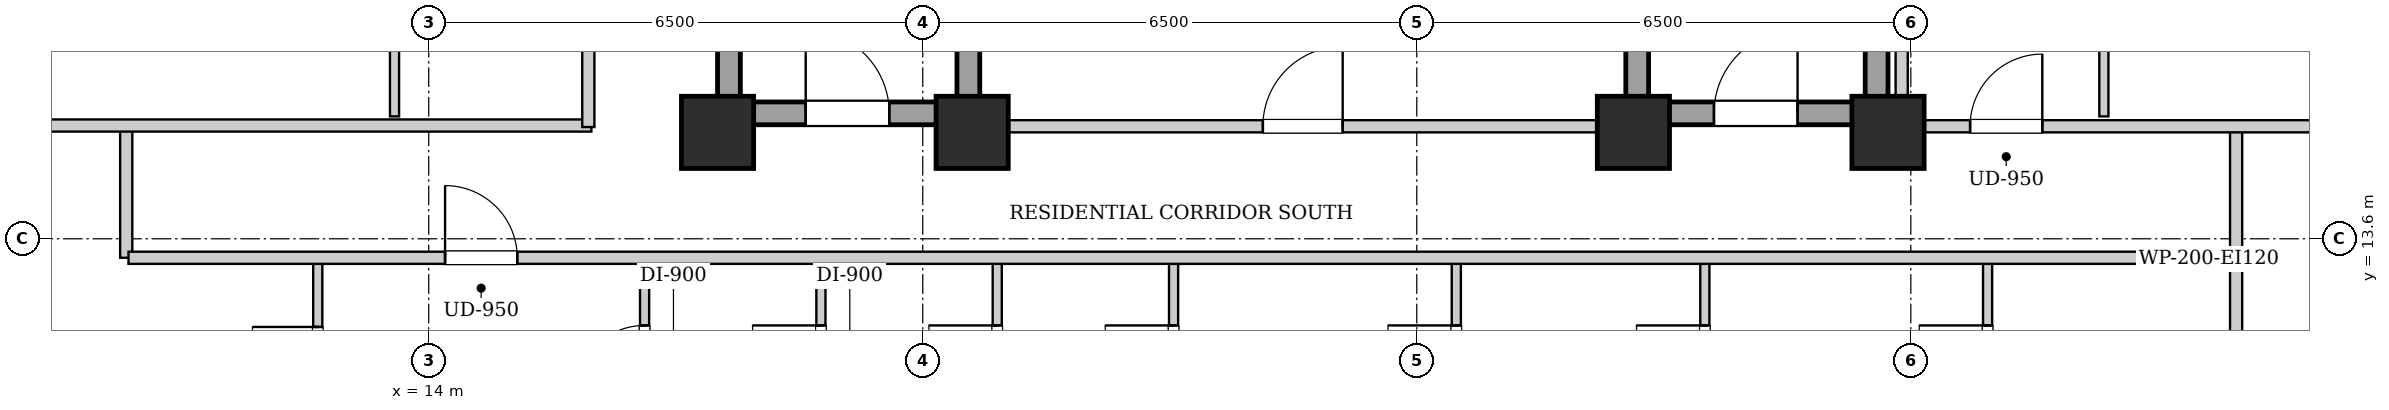
"""IFC4 building model, lengths in metres.
Left out: names, types, materials, properties, quantities, classifications, styles, units other than length and angle.
Written with IfcOpenShell. Run it as: python <this file> out.ifc"""

import sys

from ifc_helpers import new_model, si_unit, direction, frame, frame_2d, origin, origin_2d, place, context, subcontext, project, spatial, rectangle, extrude, element, fill, save


model = new_model("IFC4")
c1 = context("Model", 3, precision=1e-05, world=origin(), true_north=direction((0.0, 1.0)))
c2 = subcontext(c1, "Body", "Model", "MODEL_VIEW")
j1 = project(units=[si_unit("LENGTHUNIT", "METRE"), si_unit("PLANEANGLEUNIT", "RADIAN")], contexts=[c1])
p1 = place(None, origin())
s1 = spatial("IfcSite", under=j1, at=p1, CompositionType="ELEMENT")
p2 = place(p1, origin())
s2 = spatial("IfcBuilding", under=s1, at=p2, CompositionType="ELEMENT")
p3 = place(p2, frame((0.0, 0.0, 127.65)))
s3 = spatial("IfcBuildingStorey", under=s2, at=p3, CompositionType="ELEMENT", Elevation=127.65)
for number, where, z_axis, x_axis in (
    (1, (17.8, 15.0, 0.0), (0.0, 0.0, 1.0), (1.0, 0.0, 0.0)),
    (2, (21.15, 15.0, 0.0), (0.0, 0.0, 1.0), (1.0, 0.0, 0.0)),
    (3, (29.85, 15.0, 0.0), (0.0, 0.0, 1.0), (1.0, 0.0, 0.0)),
    (4, (33.2, 15.0, 0.0), (0.0, 0.0, 1.0), (1.0, 0.0, 0.0)),
):
    element("IfcColumn", number, at=place(p3, frame(where, z_axis=z_axis, x_axis=x_axis)), inside=s3, PredefinedType="COLUMN", context=c2, shape_type="SweptSolid", body=[
        extrude(rectangle(XDim=0.95, YDim=0.95, at=origin_2d()), origin(), (0.0, 0.0, 1.0), 3.25),
    ])
for number, where, z_axis, x_axis in (
    (5, (17.95, 15.1, 0.0), (0.0, 0.0, 1.0), (0.0, 1.0, 0.0)),
    (6, (21.1, 15.1, 0.0), (0.0, 0.0, 1.0), (0.0, 1.0, 0.0)),
):
    element("IfcWall", number, at=place(p3, frame(where, z_axis=z_axis, x_axis=x_axis)), inside=s3, PredefinedType="SHEAR", context=c2, shape_type="SweptSolid", body=[
        extrude(rectangle(XDim=9.0, YDim=0.3, at=frame_2d((4.5, 0.0))), origin(), (0.0, 0.0, 1.0), 2.99),
    ])
p4 = place(p3, frame((18.1, 15.25, 0.0), z_axis=(0.0, 0.0, 1.0), x_axis=(1.0, 0.0, 0.0)))
e7 = element("IfcWall", 7, at=p4, inside=s3, PredefinedType="SHEAR", context=c2, shape_type="SweptSolid", body=[
    extrude(rectangle(XDim=2.85, YDim=0.3, at=frame_2d((1.425, 0.0))), origin(), (0.0, 0.0, 1.0), 2.99),
])
p5 = place(p4, frame((0.86, 0.0, 0.0)))
e8 = element("IfcOpeningElement", 8, at=p5, cuts=e7, PredefinedType="OPENING", context=c2, shape_type="SweptSolid", body=[
    extrude(rectangle(XDim=1.1, YDim=2.05, at=frame_2d((0.55, 1.025))), frame((0.0, 0.16, 0.0), z_axis=(0.0, -1.0, 0.0), x_axis=(1.0, 0.0, 0.0)), (0.0, 0.0, 1.0), 0.32),
])
for number, where, z_axis, x_axis in (
    (9, (29.9, 15.1, 0.0), (0.0, 0.0, 1.0), (0.0, 1.0, 0.0)),
    (10, (33.05, 15.1, 0.0), (0.0, 0.0, 1.0), (0.0, 1.0, 0.0)),
):
    element("IfcWall", number, at=place(p3, frame(where, z_axis=z_axis, x_axis=x_axis)), inside=s3, PredefinedType="SHEAR", context=c2, shape_type="SweptSolid", body=[
        extrude(rectangle(XDim=9.0, YDim=0.3, at=frame_2d((4.5, 0.0))), origin(), (0.0, 0.0, 1.0), 2.99),
    ])
p6 = place(p3, frame((30.05, 15.25, 0.0), z_axis=(0.0, 0.0, 1.0), x_axis=(1.0, 0.0, 0.0)))
e11 = element("IfcWall", 11, at=p6, inside=s3, PredefinedType="SHEAR", context=c2, shape_type="SweptSolid", body=[
    extrude(rectangle(XDim=2.85, YDim=0.3, at=frame_2d((1.425, 0.0))), origin(), (0.0, 0.0, 1.0), 2.99),
])
p7 = place(p6, frame((0.86, 0.0, 0.0)))
e12 = element("IfcOpeningElement", 12, at=p7, cuts=e11, PredefinedType="OPENING", context=c2, shape_type="SweptSolid", body=[
    extrude(rectangle(XDim=1.1, YDim=2.05, at=frame_2d((0.55, 1.025))), frame((0.0, 0.16, 0.0), z_axis=(0.0, -1.0, 0.0), x_axis=(1.0, 0.0, 0.0)), (0.0, 0.0, 1.0), 0.32),
])
p8 = place(p3, frame((21.25, 15.08, 0.0), z_axis=(0.0, 0.0, 1.0), x_axis=(1.0, 0.0, 0.0)))
e13 = element("IfcWall", 13, at=p8, inside=s3, PredefinedType="PARTITIONING", context=c2, shape_type="SweptSolid", body=[
    extrude(rectangle(XDim=8.5, YDim=0.16, at=frame_2d((4.25, 0.0))), origin(), (0.0, 0.0, 1.0), 2.426),
])
p9 = place(p8, frame((3.725, 0.0, 0.0)))
e14 = element("IfcOpeningElement", 14, at=p9, cuts=e13, PredefinedType="OPENING", context=c2, shape_type="SweptSolid", body=[
    extrude(rectangle(XDim=1.05, YDim=2.05, at=frame_2d((0.525, 1.025))), frame((0.0, 0.09, 0.0), z_axis=(0.0, -1.0, 0.0), x_axis=(1.0, 0.0, 0.0)), (0.0, 0.0, 1.0), 0.18),
])
for number, where, z_axis, x_axis in (
    (15, (10.02, 13.35, 0.0), (0.0, 0.0, 1.0), (0.0, 1.0, 0.0)),
    (16, (37.78, 13.35, 0.0), (0.0, 0.0, 1.0), (0.0, 1.0, 0.0)),
):
    element("IfcWall", number, at=place(p3, frame(where, z_axis=z_axis, x_axis=x_axis)), inside=s3, PredefinedType="PARTITIONING", context=c2, shape_type="SweptSolid", body=[
        extrude(rectangle(XDim=1.74, YDim=0.16, at=frame_2d((0.87, 0.0))), origin(), (0.0, 0.0, 1.0), 2.99),
    ])
p10 = place(p3, frame((7.78, 15.09, 0.0), z_axis=(0.0, 0.0, 1.0), x_axis=(1.0, 0.0, 0.0)))
e17 = element("IfcWall", 17, at=p10, inside=s3, PredefinedType="PARTITIONING", context=c2, shape_type="SweptSolid", body=[
    extrude(rectangle(XDim=8.36, YDim=0.16, at=frame_2d((4.18, 0.0))), origin(), (0.0, 0.0, 1.0), 2.426),
])
p11 = place(p3, frame((37.78, 10.65, 0.0), z_axis=(0.0, 0.0, 1.0), x_axis=(0.0, 1.0, 0.0)))
e18 = element("IfcWall", 18, at=p11, inside=s3, PredefinedType="PARTITIONING", context=c2, shape_type="SweptSolid", body=[
    extrude(rectangle(XDim=2.66, YDim=0.16, at=frame_2d((1.33, 0.0))), origin(), (0.0, 0.0, 1.0), 2.99),
])
p12 = place(p3, frame((12.54, 10.71, 0.0), z_axis=(0.0, 0.0, 1.0), x_axis=(0.0, 1.0, 0.0)))
e19 = element("IfcWall", 19, at=p12, inside=s3, PredefinedType="PARTITIONING", context=c2, shape_type="SweptSolid", body=[
    extrude(rectangle(XDim=2.6, YDim=0.12, at=frame_2d((1.3, 0.0))), origin(), (0.0, 0.0, 1.0), 2.99),
])
p13 = place(p12, frame((0.87, 0.0, 0.0)))
e20 = element("IfcOpeningElement", 20, at=p13, cuts=e19, PredefinedType="OPENING", context=c2, shape_type="SweptSolid", body=[
    extrude(rectangle(XDim=0.86, YDim=2.05, at=frame_2d((0.43, 1.025))), frame((0.0, 0.07, 0.0), z_axis=(0.0, -1.0, 0.0), x_axis=(1.0, 0.0, 0.0)), (0.0, 0.0, 1.0), 0.14),
])
p14 = place(p3, frame((16.84, 10.71, 0.0), z_axis=(0.0, 0.0, 1.0), x_axis=(0.0, 1.0, 0.0)))
e21 = element("IfcWall", 21, at=p14, inside=s3, PredefinedType="PARTITIONING", context=c2, shape_type="SweptSolid", body=[
    extrude(rectangle(XDim=2.6, YDim=0.12, at=frame_2d((1.3, 0.0))), origin(), (0.0, 0.0, 1.0), 2.99),
])
p15 = place(p14, frame((0.85, 0.0, 0.0)))
e22 = element("IfcOpeningElement", 22, at=p15, cuts=e21, PredefinedType="OPENING", context=c2, shape_type="SweptSolid", body=[
    extrude(rectangle(XDim=0.9, YDim=2.05, at=frame_2d((0.45, 1.025))), frame((0.0, 0.07, 0.0), z_axis=(0.0, -1.0, 0.0), x_axis=(1.0, 0.0, 0.0)), (0.0, 0.0, 1.0), 0.14),
])
p16 = place(p3, frame((19.16, 10.71, 0.0), z_axis=(0.0, 0.0, 1.0), x_axis=(0.0, 1.0, 0.0)))
e23 = element("IfcWall", 23, at=p16, inside=s3, PredefinedType="PARTITIONING", context=c2, shape_type="SweptSolid", body=[
    extrude(rectangle(XDim=2.6, YDim=0.12, at=frame_2d((1.3, 0.0))), origin(), (0.0, 0.0, 1.0), 2.99),
])
p17 = place(p16, frame((0.85, 0.0, 0.0)))
e24 = element("IfcOpeningElement", 24, at=p17, cuts=e23, PredefinedType="OPENING", context=c2, shape_type="SweptSolid", body=[
    extrude(rectangle(XDim=0.9, YDim=2.05, at=frame_2d((0.45, 1.025))), frame((0.0, 0.07, 0.0), z_axis=(0.0, -1.0, 0.0), x_axis=(1.0, 0.0, 0.0)), (0.0, 0.0, 1.0), 0.14),
])
p18 = place(p3, frame((21.48, 10.71, 0.0), z_axis=(0.0, 0.0, 1.0), x_axis=(0.0, 1.0, 0.0)))
e25 = element("IfcWall", 25, at=p18, inside=s3, PredefinedType="PARTITIONING", context=c2, shape_type="SweptSolid", body=[
    extrude(rectangle(XDim=2.6, YDim=0.12, at=frame_2d((1.3, 0.0))), origin(), (0.0, 0.0, 1.0), 2.99),
])
p19 = place(p18, frame((0.85, 0.0, 0.0)))
e26 = element("IfcOpeningElement", 26, at=p19, cuts=e25, PredefinedType="OPENING", context=c2, shape_type="SweptSolid", body=[
    extrude(rectangle(XDim=0.9, YDim=2.05, at=frame_2d((0.45, 1.025))), frame((0.0, 0.07, 0.0), z_axis=(0.0, -1.0, 0.0), x_axis=(1.0, 0.0, 0.0)), (0.0, 0.0, 1.0), 0.14),
])
p20 = place(p3, frame((23.8, 10.71, 0.0), z_axis=(0.0, 0.0, 1.0), x_axis=(0.0, 1.0, 0.0)))
e27 = element("IfcWall", 27, at=p20, inside=s3, PredefinedType="PARTITIONING", context=c2, shape_type="SweptSolid", body=[
    extrude(rectangle(XDim=2.6, YDim=0.12, at=frame_2d((1.3, 0.0))), origin(), (0.0, 0.0, 1.0), 2.99),
])
p21 = place(p20, frame((0.85, 0.0, 0.0)))
e28 = element("IfcOpeningElement", 28, at=p21, cuts=e27, PredefinedType="OPENING", context=c2, shape_type="SweptSolid", body=[
    extrude(rectangle(XDim=0.9, YDim=2.05, at=frame_2d((0.45, 1.025))), frame((0.0, 0.07, 0.0), z_axis=(0.0, -1.0, 0.0), x_axis=(1.0, 0.0, 0.0)), (0.0, 0.0, 1.0), 0.14),
])
p22 = place(p3, frame((27.52, 10.71, 0.0), z_axis=(0.0, 0.0, 1.0), x_axis=(0.0, 1.0, 0.0)))
e29 = element("IfcWall", 29, at=p22, inside=s3, PredefinedType="PARTITIONING", context=c2, shape_type="SweptSolid", body=[
    extrude(rectangle(XDim=2.6, YDim=0.12, at=frame_2d((1.3, 0.0))), origin(), (0.0, 0.0, 1.0), 2.99),
])
p23 = place(p22, frame((0.85, 0.0, 0.0)))
e30 = element("IfcOpeningElement", 30, at=p23, cuts=e29, PredefinedType="OPENING", context=c2, shape_type="SweptSolid", body=[
    extrude(rectangle(XDim=0.9, YDim=2.05, at=frame_2d((0.45, 1.025))), frame((0.0, 0.07, 0.0), z_axis=(0.0, -1.0, 0.0), x_axis=(1.0, 0.0, 0.0)), (0.0, 0.0, 1.0), 0.14),
])
p24 = place(p3, frame((30.79, 10.71, 0.0), z_axis=(0.0, 0.0, 1.0), x_axis=(0.0, 1.0, 0.0)))
e31 = element("IfcWall", 31, at=p24, inside=s3, PredefinedType="PARTITIONING", context=c2, shape_type="SweptSolid", body=[
    extrude(rectangle(XDim=2.6, YDim=0.12, at=frame_2d((1.3, 0.0))), origin(), (0.0, 0.0, 1.0), 2.99),
])
p25 = place(p24, frame((0.85, 0.0, 0.0)))
e32 = element("IfcOpeningElement", 32, at=p25, cuts=e31, PredefinedType="OPENING", context=c2, shape_type="SweptSolid", body=[
    extrude(rectangle(XDim=0.9, YDim=2.05, at=frame_2d((0.45, 1.025))), frame((0.0, 0.07, 0.0), z_axis=(0.0, -1.0, 0.0), x_axis=(1.0, 0.0, 0.0)), (0.0, 0.0, 1.0), 0.14),
])
p26 = place(p3, frame((34.51, 10.71, 0.0), z_axis=(0.0, 0.0, 1.0), x_axis=(0.0, 1.0, 0.0)))
e33 = element("IfcWall", 33, at=p26, inside=s3, PredefinedType="PARTITIONING", context=c2, shape_type="SweptSolid", body=[
    extrude(rectangle(XDim=2.6, YDim=0.12, at=frame_2d((1.3, 0.0))), origin(), (0.0, 0.0, 1.0), 2.99),
])
p27 = place(p26, frame((0.85, 0.0, 0.0)))
e34 = element("IfcOpeningElement", 34, at=p27, cuts=e33, PredefinedType="OPENING", context=c2, shape_type="SweptSolid", body=[
    extrude(rectangle(XDim=0.9, YDim=2.05, at=frame_2d((0.45, 1.025))), frame((0.0, 0.07, 0.0), z_axis=(0.0, -1.0, 0.0), x_axis=(1.0, 0.0, 0.0)), (0.0, 0.0, 1.0), 0.14),
])
p28 = place(p3, frame((13.55, 15.21, 0.0), z_axis=(0.0, 0.0, 1.0), x_axis=(0.0, 1.0, 0.0)))
e35 = element("IfcWall", 35, at=p28, inside=s3, PredefinedType="PARTITIONING", context=c2, shape_type="SweptSolid", body=[
    extrude(rectangle(XDim=1.85, YDim=0.12, at=frame_2d((0.925, 0.0))), origin(), (0.0, 0.0, 1.0), 2.99),
])
p29 = place(p3, frame((33.38, 15.08, 0.0), z_axis=(0.0, 0.0, 1.0), x_axis=(1.0, 0.0, 0.0)))
e36 = element("IfcWall", 36, at=p29, inside=s3, PredefinedType="PARTITIONING", context=c2, shape_type="SweptSolid", body=[
    extrude(rectangle(XDim=6.64, YDim=0.16, at=frame_2d((3.32, 0.0))), origin(), (0.0, 0.0, 1.0), 2.426),
])
p30 = place(p29, frame((0.9, 0.0, 0.0)))
e37 = element("IfcOpeningElement", 37, at=p30, cuts=e36, PredefinedType="OPENING", context=c2, shape_type="SweptSolid", body=[
    extrude(rectangle(XDim=0.95, YDim=2.1, at=frame_2d((0.475, 1.05))), frame((0.0, 0.09, 0.0), z_axis=(0.0, -1.0, 0.0), x_axis=(1.0, 0.0, 0.0)), (0.0, 0.0, 1.0), 0.18),
])
p31 = place(p3, frame((36.04, 15.21, 0.0), z_axis=(0.0, 0.0, 1.0), x_axis=(0.0, 1.0, 0.0)))
e38 = element("IfcWall", 38, at=p31, inside=s3, PredefinedType="PARTITIONING", context=c2, shape_type="SweptSolid", body=[
    extrude(rectangle(XDim=4.308, YDim=0.12, at=frame_2d((2.154, 0.0))), origin(), (0.0, 0.0, 1.0), 2.99),
])
p32 = place(p31, frame((1.704, 0.0, 0.0)))
e39 = element("IfcOpeningElement", 39, at=p32, cuts=e38, PredefinedType="OPENING", context=c2, shape_type="SweptSolid", body=[
    extrude(rectangle(XDim=0.9, YDim=2.05, at=frame_2d((0.45, 1.025))), frame((0.0, 0.07, 0.0), z_axis=(0.0, -1.0, 0.0), x_axis=(1.0, 0.0, 0.0)), (0.0, 0.0, 1.0), 0.14),
])
p33 = place(p3, frame((10.05, 13.35, 0.0), z_axis=(0.0, 0.0, 1.0), x_axis=(1.0, 0.0, 0.0)))
e40 = element("IfcWall", 40, at=p33, inside=s3, PredefinedType="PARTITIONING", context=c2, shape_type="SweptSolid", body=[
    extrude(rectangle(XDim=27.7, YDim=0.16, at=frame_2d((13.85, 0.0))), origin(), (0.0, 0.0, 1.0), 2.99),
])
p34 = place(p33, frame((4.165, 0.0, 0.0)))
e41 = element("IfcOpeningElement", 41, at=p34, cuts=e40, PredefinedType="OPENING", context=c2, shape_type="SweptSolid", body=[
    extrude(rectangle(XDim=0.95, YDim=2.1, at=frame_2d((0.475, 1.05))), frame((0.0, 0.09, 0.0), z_axis=(0.0, -1.0, 0.0), x_axis=(1.0, 0.0, 0.0)), (0.0, 0.0, 1.0), 0.18),
])
p35 = place(p3, frame((16.1, 15.07, 0.0), z_axis=(0.0, 0.0, 1.0), x_axis=(0.0, 1.0, 0.0)))
e42 = element("IfcWall", 42, at=p35, inside=s3, PredefinedType="PARTITIONING", context=c2, shape_type="SweptSolid", body=[
    extrude(rectangle(XDim=13.93, YDim=0.16, at=frame_2d((6.965, 0.0))), origin(), (0.0, 0.0, 1.0), 2.99),
])
p36 = place(p35, frame((3.608, 0.0, 0.0)))
e43 = element("IfcOpeningElement", 43, at=p36, cuts=e42, PredefinedType="OPENING", context=c2, shape_type="SweptSolid", body=[
    extrude(rectangle(XDim=0.95, YDim=2.1, at=frame_2d((0.475, 1.05))), frame((0.0, 0.09, 0.0), z_axis=(0.0, -1.0, 0.0), x_axis=(1.0, 0.0, 0.0)), (0.0, 0.0, 1.0), 0.18),
])
p37 = place(p35, frame((10.649, 0.0, 0.0)))
e44 = element("IfcOpeningElement", 44, at=p37, cuts=e42, PredefinedType="OPENING", context=c2, shape_type="SweptSolid", body=[
    extrude(rectangle(XDim=0.95, YDim=2.1, at=frame_2d((0.475, 1.05))), frame((0.0, 0.09, 0.0), z_axis=(0.0, -1.0, 0.0), x_axis=(1.0, 0.0, 0.0)), (0.0, 0.0, 1.0), 0.18),
])
p38 = place(p3, frame((33.38, 15.02, 0.0), z_axis=(0.0, 0.0, 1.0), x_axis=(0.0, 1.0, 0.0)))
e45 = element("IfcWall", 45, at=p38, inside=s3, PredefinedType="PARTITIONING", context=c2, shape_type="SweptSolid", body=[
    extrude(rectangle(XDim=13.98, YDim=0.16, at=frame_2d((6.99, 0.0))), origin(), (0.0, 0.0, 1.0), 2.325),
])
p39 = place(p5, origin())
e46 = element("IfcDoor", 46, at=p39, inside=s3, OperationType="SINGLE_SWING_LEFT", PredefinedType="DOOR", context=c2, shape_type="SweptSolid", body=[
    extrude(rectangle(XDim=1.1, YDim=2.05, at=frame_2d((0.55, 1.025))), frame((0.0, 0.025, 0.0), z_axis=(0.0, -1.0, 0.0), x_axis=(1.0, 0.0, 0.0)), (0.0, 0.0, 1.0), 0.05),
])
fill(e8, e46)
p40 = place(p7, origin())
e47 = element("IfcDoor", 47, at=p40, inside=s3, OperationType="SINGLE_SWING_RIGHT", PredefinedType="DOOR", context=c2, shape_type="SweptSolid", body=[
    extrude(rectangle(XDim=1.1, YDim=2.05, at=frame_2d((0.55, 1.025))), frame((0.0, 0.025, 0.0), z_axis=(0.0, -1.0, 0.0), x_axis=(1.0, 0.0, 0.0)), (0.0, 0.0, 1.0), 0.05),
])
fill(e12, e47)
p41 = place(p9, origin())
e48 = element("IfcDoor", 48, at=p41, inside=s3, OperationType="SINGLE_SWING_RIGHT", PredefinedType="DOOR", context=c2, shape_type="SweptSolid", body=[
    extrude(rectangle(XDim=1.05, YDim=2.05, at=frame_2d((0.525, 1.025))), frame((0.0, 0.025, 0.0), z_axis=(0.0, -1.0, 0.0), x_axis=(1.0, 0.0, 0.0)), (0.0, 0.0, 1.0), 0.05),
])
fill(e14, e48)
p42 = place(p13, origin())
e49 = element("IfcDoor", 49, at=p42, inside=s3, OperationType="SINGLE_SWING_RIGHT", PredefinedType="DOOR", context=c2, shape_type="SweptSolid", body=[
    extrude(rectangle(XDim=0.86, YDim=2.05, at=frame_2d((0.43, 1.025))), frame((0.0, 0.025, 0.0), z_axis=(0.0, -1.0, 0.0), x_axis=(1.0, 0.0, 0.0)), (0.0, 0.0, 1.0), 0.05),
])
fill(e20, e49)
p43 = place(p15, origin())
e50 = element("IfcDoor", 50, at=p43, inside=s3, OperationType="SINGLE_SWING_LEFT", PredefinedType="DOOR", context=c2, shape_type="SweptSolid", body=[
    extrude(rectangle(XDim=0.9, YDim=2.05, at=frame_2d((0.45, 1.025))), frame((0.0, 0.025, 0.0), z_axis=(0.0, -1.0, 0.0), x_axis=(1.0, 0.0, 0.0)), (0.0, 0.0, 1.0), 0.05),
])
fill(e22, e50)
p44 = place(p17, origin())
e51 = element("IfcDoor", 51, at=p44, inside=s3, OperationType="SINGLE_SWING_RIGHT", PredefinedType="DOOR", context=c2, shape_type="SweptSolid", body=[
    extrude(rectangle(XDim=0.9, YDim=2.05, at=frame_2d((0.45, 1.025))), frame((0.0, 0.025, 0.0), z_axis=(0.0, -1.0, 0.0), x_axis=(1.0, 0.0, 0.0)), (0.0, 0.0, 1.0), 0.05),
])
fill(e24, e51)
p45 = place(p19, origin())
e52 = element("IfcDoor", 52, at=p45, inside=s3, OperationType="SINGLE_SWING_RIGHT", PredefinedType="DOOR", context=c2, shape_type="SweptSolid", body=[
    extrude(rectangle(XDim=0.9, YDim=2.05, at=frame_2d((0.45, 1.025))), frame((0.0, 0.025, 0.0), z_axis=(0.0, -1.0, 0.0), x_axis=(1.0, 0.0, 0.0)), (0.0, 0.0, 1.0), 0.05),
])
fill(e26, e52)
p46 = place(p21, origin())
e53 = element("IfcDoor", 53, at=p46, inside=s3, OperationType="SINGLE_SWING_RIGHT", PredefinedType="DOOR", context=c2, shape_type="SweptSolid", body=[
    extrude(rectangle(XDim=0.9, YDim=2.05, at=frame_2d((0.45, 1.025))), frame((0.0, 0.025, 0.0), z_axis=(0.0, -1.0, 0.0), x_axis=(1.0, 0.0, 0.0)), (0.0, 0.0, 1.0), 0.05),
])
fill(e28, e53)
p47 = place(p23, origin())
e54 = element("IfcDoor", 54, at=p47, inside=s3, OperationType="SINGLE_SWING_RIGHT", PredefinedType="DOOR", context=c2, shape_type="SweptSolid", body=[
    extrude(rectangle(XDim=0.9, YDim=2.05, at=frame_2d((0.45, 1.025))), frame((0.0, 0.025, 0.0), z_axis=(0.0, -1.0, 0.0), x_axis=(1.0, 0.0, 0.0)), (0.0, 0.0, 1.0), 0.05),
])
fill(e30, e54)
p48 = place(p25, origin())
e55 = element("IfcDoor", 55, at=p48, inside=s3, OperationType="SINGLE_SWING_RIGHT", PredefinedType="DOOR", context=c2, shape_type="SweptSolid", body=[
    extrude(rectangle(XDim=0.9, YDim=2.05, at=frame_2d((0.45, 1.025))), frame((0.0, 0.025, 0.0), z_axis=(0.0, -1.0, 0.0), x_axis=(1.0, 0.0, 0.0)), (0.0, 0.0, 1.0), 0.05),
])
fill(e32, e55)
p49 = place(p27, origin())
e56 = element("IfcDoor", 56, at=p49, inside=s3, OperationType="SINGLE_SWING_RIGHT", PredefinedType="DOOR", context=c2, shape_type="SweptSolid", body=[
    extrude(rectangle(XDim=0.9, YDim=2.05, at=frame_2d((0.45, 1.025))), frame((0.0, 0.025, 0.0), z_axis=(0.0, -1.0, 0.0), x_axis=(1.0, 0.0, 0.0)), (0.0, 0.0, 1.0), 0.05),
])
fill(e34, e56)
p50 = place(p30, origin())
e57 = element("IfcDoor", 57, at=p50, inside=s3, OperationType="SINGLE_SWING_RIGHT", PredefinedType="DOOR", context=c2, shape_type="SweptSolid", body=[
    extrude(rectangle(XDim=0.95, YDim=2.1, at=frame_2d((0.475, 1.05))), frame((0.0, 0.025, 0.0), z_axis=(0.0, -1.0, 0.0), x_axis=(1.0, 0.0, 0.0)), (0.0, 0.0, 1.0), 0.05),
])
fill(e37, e57)
p51 = place(p34, origin())
e58 = element("IfcDoor", 58, at=p51, inside=s3, OperationType="SINGLE_SWING_LEFT", PredefinedType="DOOR", context=c2, shape_type="SweptSolid", body=[
    extrude(rectangle(XDim=0.95, YDim=2.1, at=frame_2d((0.475, 1.05))), frame((0.0, 0.025, 0.0), z_axis=(0.0, -1.0, 0.0), x_axis=(1.0, 0.0, 0.0)), (0.0, 0.0, 1.0), 0.05),
])
fill(e41, e58)
save(model, sys.argv[1])
